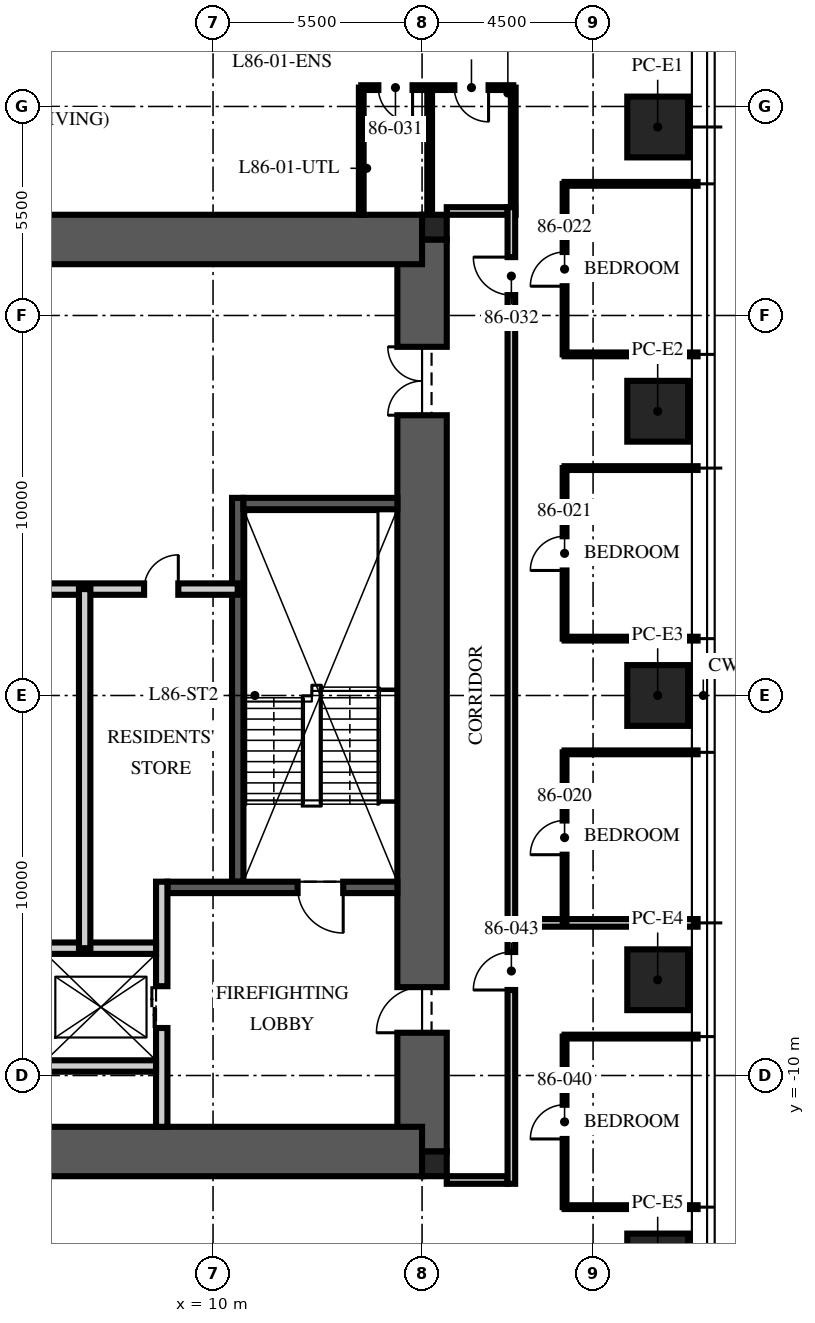
"""IFC4 building model, lengths in metres.
Left out: names, types, materials, properties, quantities, classifications, styles, units other than length and angle.
Written with IfcOpenShell. Run it as: python <this file> out.ifc"""

import sys

from ifc_helpers import new_model, si_unit, direction, frame, frame_2d, origin, origin_2d, place, context, subcontext, project, spatial, rectangle, extrude, element, fill, save


model = new_model("IFC4")
c1 = context("Model", 3, precision=1e-05, world=origin(), true_north=direction((0.0, 1.0)))
c2 = subcontext(c1, "Body", "Model", "MODEL_VIEW")
j1 = project(units=[si_unit("LENGTHUNIT", "METRE"), si_unit("PLANEANGLEUNIT", "RADIAN")], contexts=[c1])
p1 = place(None, origin())
s1 = spatial("IfcSite", under=j1, at=p1, CompositionType="ELEMENT")
p2 = place(p1, origin())
s2 = spatial("IfcBuilding", under=s1, at=p2, CompositionType="ELEMENT")
p3 = place(p2, frame((0.0, 0.0, 342.0)))
s3 = spatial("IfcBuildingStorey", under=s2, at=p3, CompositionType="ELEMENT", Elevation=342.0)
p4 = place(p3, frame((15.5, -12.0, -0.25), z_axis=(0.0, 0.0, 1.0), x_axis=(0.0, 1.0, 0.0)))
e1 = element("IfcWall", 1, at=p4, inside=s3, PredefinedType="SHEAR", context=c2, shape_type="SweptSolid", body=[
    extrude(rectangle(XDim=24.0, YDim=1.3, at=frame_2d((12.0, 0.0))), origin(), (0.0, 0.0, 1.0), 3.75),
])
p5 = place(p4, frame((3.125, 0.0, 0.25)))
e2 = element("IfcOpeningElement", 2, at=p5, cuts=e1, PredefinedType="OPENING", context=c2, shape_type="SweptSolid", body=[
    extrude(rectangle(XDim=1.2, YDim=2.1, at=frame_2d((0.6, 1.05))), frame((0.0, 0.66, 0.0), z_axis=(0.0, -1.0, 0.0), x_axis=(1.0, 0.0, 0.0)), (0.0, 0.0, 1.0), 1.32),
])
p6 = place(p4, frame((19.375, 0.0, 0.25)))
e3 = element("IfcOpeningElement", 3, at=p6, cuts=e1, PredefinedType="OPENING", context=c2, shape_type="SweptSolid", body=[
    extrude(rectangle(XDim=1.8, YDim=2.1, at=frame_2d((0.9, 1.05))), frame((0.0, 0.66, 0.0), z_axis=(0.0, -1.0, 0.0), x_axis=(1.0, 0.0, 0.0)), (0.0, 0.0, 1.0), 1.32),
])
for number, where, z_axis, x_axis in (
    (4, (-15.5, 12.0, -0.25), (0.0, 0.0, 1.0), (1.0, 0.0, 0.0)),
    (5, (-15.5, -12.0, -0.25), (0.0, 0.0, 1.0), (1.0, 0.0, 0.0)),
):
    element("IfcWall", number, at=place(p3, frame(where, z_axis=z_axis, x_axis=x_axis)), inside=s3, PredefinedType="SHEAR", context=c2, shape_type="SweptSolid", body=[
        extrude(rectangle(XDim=31.0, YDim=1.3, at=frame_2d((15.5, 0.0))), origin(), (0.0, 0.0, 1.0), 3.75),
    ])
for number, where, z_axis, x_axis in (
    (6, (15.825, 12.325, -0.25), (0.0, 0.0, 1.0), (1.0, 0.0, 0.0)),
    (7, (15.825, -12.325, -0.25), (0.0, 0.0, 1.0), (1.0, 0.0, 0.0)),
):
    element("IfcColumn", number, at=place(p3, frame(where, z_axis=z_axis, x_axis=x_axis)), inside=s3, PredefinedType="COLUMN", context=c2, shape_type="SweptSolid", body=[
        extrude(rectangle(XDim=0.65, YDim=0.65, at=origin_2d()), origin(), (0.0, 0.0, 1.0), 3.75),
    ])
for number, where, z_axis, x_axis in (
    (8, (21.7, 14.96, 0.0), (0.0, 0.0, 1.0), (0.0, 1.0, 0.0)),
    (9, (21.7, 7.48, 0.0), (0.0, 0.0, 1.0), (0.0, 1.0, 0.0)),
    (10, (21.7, 0.0, 0.0), (0.0, 0.0, 1.0), (0.0, 1.0, 0.0)),
    (11, (21.7, -7.48, 0.0), (0.0, 0.0, 1.0), (0.0, 1.0, 0.0)),
    (12, (21.7, -14.96, 0.0), (0.0, 0.0, 1.0), (0.0, 1.0, 0.0)),
):
    element("IfcColumn", number, at=place(p3, frame(where, z_axis=z_axis, x_axis=x_axis)), inside=s3, PredefinedType="COLUMN", context=c2, shape_type="SweptSolid", body=[
        extrude(rectangle(XDim=1.6, YDim=1.6, at=origin_2d()), origin(), (0.0, 0.0, 1.0), 3.75),
    ])
p7 = place(p3, frame((10.65, -4.9, 0.0), z_axis=(0.0, 0.0, 1.0), x_axis=(0.0, 1.0, 0.0)))
e13 = element("IfcWall", 13, at=p7, inside=s3, PredefinedType="SOLIDWALL", context=c2, shape_type="SweptSolid", body=[
    extrude(rectangle(XDim=10.1, YDim=0.3, at=frame_2d((5.05, 0.0))), origin(), (0.0, 0.0, 1.0), 3.5),
])
p8 = place(p3, frame((14.85, -5.05, 0.0), z_axis=(0.0, 0.0, 1.0), x_axis=(-1.0, 0.0, 0.0)))
e14 = element("IfcWall", 14, at=p8, inside=s3, PredefinedType="SOLIDWALL", context=c2, shape_type="SweptSolid", body=[
    extrude(rectangle(XDim=6.05, YDim=0.3, at=frame_2d((3.025, 0.0))), origin(), (0.0, 0.0, 1.0), 3.5),
])
p9 = place(p8, frame((1.425, 0.0, 0.0)))
e15 = element("IfcOpeningElement", 15, at=p9, cuts=e14, PredefinedType="OPENING", context=c2, shape_type="SweptSolid", body=[
    extrude(rectangle(XDim=1.2, YDim=2.1, at=frame_2d((0.6, 1.05))), frame((0.0, 0.16, 0.0), z_axis=(0.0, -1.0, 0.0), x_axis=(1.0, 0.0, 0.0)), (0.0, 0.0, 1.0), 0.32),
])
p10 = place(p3, frame((14.85, 5.05, 0.0), z_axis=(0.0, 0.0, 1.0), x_axis=(-1.0, 0.0, 0.0)))
e16 = element("IfcWall", 16, at=p10, inside=s3, PredefinedType="SOLIDWALL", context=c2, shape_type="SweptSolid", body=[
    extrude(rectangle(XDim=4.05, YDim=0.3, at=frame_2d((2.025, 0.0))), origin(), (0.0, 0.0, 1.0), 3.5),
])
p11 = place(p3, frame((8.65, -11.35, 0.0), z_axis=(0.0, 0.0, 1.0), x_axis=(0.0, 1.0, 0.0)))
e17 = element("IfcWall", 17, at=p11, inside=s3, PredefinedType="PARTITIONING", context=c2, shape_type="SweptSolid", body=[
    extrude(rectangle(XDim=6.45, YDim=0.3, at=frame_2d((3.225, 0.0))), origin(), (0.0, 0.0, 1.0), 3.5),
])
p12 = place(p11, frame((2.6, 0.0, 0.0)))
e18 = element("IfcOpeningElement", 18, at=p12, cuts=e17, PredefinedType="OPENING", context=c2, shape_type="SweptSolid", body=[
    extrude(rectangle(XDim=1.1, YDim=2.1, at=frame_2d((0.55, 1.05))), frame((0.0, 0.16, 0.0), z_axis=(0.0, -1.0, 0.0), x_axis=(1.0, 0.0, 0.0)), (0.0, 0.0, 1.0), 0.32),
])
p13 = place(p3, frame((-8.5, -6.65, 0.0), z_axis=(0.0, 0.0, 1.0), x_axis=(1.0, 0.0, 0.0)))
e19 = element("IfcWall", 19, at=p13, inside=s3, PredefinedType="PARTITIONING", context=c2, shape_type="SweptSolid", body=[
    extrude(rectangle(XDim=17.0, YDim=0.3, at=frame_2d((8.5, 0.0))), origin(), (0.0, 0.0, 1.0), 3.5),
])
p14 = place(p13, frame((7.8, 0.0, 0.0)))
e20 = element("IfcOpeningElement", 20, at=p14, cuts=e19, PredefinedType="OPENING", context=c2, shape_type="SweptSolid", body=[
    extrude(rectangle(XDim=1.3, YDim=2.4, at=frame_2d((0.65, 1.2))), frame((0.0, 0.16, 0.0), z_axis=(0.0, -1.0, 0.0), x_axis=(1.0, 0.0, 0.0)), (0.0, 0.0, 1.0), 0.32),
])
p15 = place(p13, frame((5.65, 0.0, 0.0)))
e21 = element("IfcOpeningElement", 21, at=p15, cuts=e19, PredefinedType="OPENING", context=c2, shape_type="SweptSolid", body=[
    extrude(rectangle(XDim=0.9, YDim=2.1, at=frame_2d((0.45, 1.05))), frame((0.0, 0.16, 0.0), z_axis=(0.0, -1.0, 0.0), x_axis=(1.0, 0.0, 0.0)), (0.0, 0.0, 1.0), 0.32),
])
p16 = place(p13, frame((10.4, 0.0, 0.0)))
e22 = element("IfcOpeningElement", 22, at=p16, cuts=e19, PredefinedType="OPENING", context=c2, shape_type="SweptSolid", body=[
    extrude(rectangle(XDim=0.9, YDim=2.1, at=frame_2d((0.45, 1.05))), frame((0.0, 0.16, 0.0), z_axis=(0.0, -1.0, 0.0), x_axis=(1.0, 0.0, 0.0)), (0.0, 0.0, 1.0), 0.32),
])
p17 = place(p3, frame((5.6, -9.75, 0.0), z_axis=(0.0, 0.0, 1.0), x_axis=(1.0, 0.0, 0.0)))
e23 = element("IfcWall", 23, at=p17, inside=s3, PredefinedType="PARTITIONING", context=c2, shape_type="SweptSolid", body=[
    extrude(rectangle(XDim=2.9, YDim=0.3, at=frame_2d((1.45, 0.0))), origin(), (0.0, 0.0, 1.0), 3.5),
])
p18 = place(p3, frame((-10.65, 2.8, 0.0), z_axis=(0.0, 0.0, 1.0), x_axis=(1.0, 0.0, 0.0)))
e24 = element("IfcWall", 24, at=p18, inside=s3, PredefinedType="PARTITIONING", context=c2, shape_type="SweptSolid", body=[
    extrude(rectangle(XDim=21.3, YDim=0.3, at=frame_2d((10.65, 0.0))), origin(), (0.0, 0.0, 1.0), 3.5),
])
p19 = place(p18, frame((10.05, 0.0, 0.0)))
e25 = element("IfcOpeningElement", 25, at=p19, cuts=e24, PredefinedType="OPENING", context=c2, shape_type="SweptSolid", body=[
    extrude(rectangle(XDim=1.2, YDim=2.1, at=frame_2d((0.6, 1.05))), frame((0.0, 0.16, 0.0), z_axis=(0.0, -1.0, 0.0), x_axis=(1.0, 0.0, 0.0)), (0.0, 0.0, 1.0), 0.32),
])
p20 = place(p18, frame((1.493, 0.0, 0.0)))
e26 = element("IfcOpeningElement", 26, at=p20, cuts=e24, PredefinedType="OPENING", context=c2, shape_type="SweptSolid", body=[
    extrude(rectangle(XDim=0.9, YDim=2.1, at=frame_2d((0.45, 1.05))), frame((0.0, 0.16, 0.0), z_axis=(0.0, -1.0, 0.0), x_axis=(1.0, 0.0, 0.0)), (0.0, 0.0, 1.0), 0.32),
])
p21 = place(p18, frame((18.836, 0.0, 0.0)))
e27 = element("IfcOpeningElement", 27, at=p21, cuts=e24, PredefinedType="OPENING", context=c2, shape_type="SweptSolid", body=[
    extrude(rectangle(XDim=0.9, YDim=2.1, at=frame_2d((0.45, 1.05))), frame((0.0, 0.16, 0.0), z_axis=(0.0, -1.0, 0.0), x_axis=(1.0, 0.0, 0.0)), (0.0, 0.0, 1.0), 0.32),
])
p22 = place(p3, frame((6.622, -6.65, 0.0), z_axis=(0.0, 0.0, 1.0), x_axis=(0.0, 1.0, 0.0)))
e28 = element("IfcWall", 28, at=p22, inside=s3, PredefinedType="PARTITIONING", context=c2, shape_type="SweptSolid", body=[
    extrude(rectangle(XDim=9.45, YDim=0.3, at=frame_2d((4.725, 0.0))), origin(), (0.0, 0.0, 1.0), 3.5),
])
for number, where, z_axis, x_axis in (
    (29, (16.15, 12.75, 0.0), (0.0, 0.0, 1.0), (1.0, 0.0, 0.0)),
    (30, (16.15, -12.75, 0.0), (0.0, 0.0, 1.0), (1.0, 0.0, 0.0)),
):
    element("IfcWall", number, at=place(p3, frame(where, z_axis=z_axis, x_axis=x_axis)), inside=s3, PredefinedType="PARTITIONING", context=c2, shape_type="SweptSolid", body=[
        extrude(rectangle(XDim=1.6, YDim=0.2, at=frame_2d((0.8, 0.0))), origin(), (0.0, 0.0, 1.0), 2.6),
    ])
p23 = place(p3, frame((17.95, -5.984, 0.0), z_axis=(0.0, 0.0, 1.0), x_axis=(1.0, 0.0, 0.0)))
e31 = element("IfcWall", 31, at=p23, inside=s3, PredefinedType="PARTITIONING", context=c2, shape_type="SweptSolid", body=[
    extrude(rectangle(XDim=4.8, YDim=0.2, at=frame_2d((2.4, 0.0))), origin(), (0.0, 0.0, 1.0), 3.01),
])
for number, where, z_axis, x_axis in (
    (32, (19.25, -1.496, 0.0), (0.0, 0.0, 1.0), (1.0, 0.0, 0.0)),
    (33, (19.25, 1.496, 0.0), (0.0, 0.0, 1.0), (1.0, 0.0, 0.0)),
    (34, (19.25, 5.984, 0.0), (0.0, 0.0, 1.0), (1.0, 0.0, 0.0)),
    (35, (19.25, 8.976, 0.0), (0.0, 0.0, 1.0), (1.0, 0.0, 0.0)),
    (36, (19.25, 13.464, 0.0), (0.0, 0.0, 1.0), (1.0, 0.0, 0.0)),
    (37, (19.25, -13.464, 0.0), (0.0, 0.0, 1.0), (1.0, 0.0, 0.0)),
    (38, (19.25, -8.976, 0.0), (0.0, 0.0, 1.0), (1.0, 0.0, 0.0)),
):
    element("IfcWall", number, at=place(p3, frame(where, z_axis=z_axis, x_axis=x_axis)), inside=s3, PredefinedType="PARTITIONING", context=c2, shape_type="SweptSolid", body=[
        extrude(rectangle(XDim=3.5, YDim=0.1, at=frame_2d((1.75, 0.0))), origin(), (0.0, 0.0, 1.0), 3.01),
    ])
p24 = place(p3, frame((19.25, -5.984, 0.0), z_axis=(0.0, 0.0, 1.0), x_axis=(0.0, 1.0, 0.0)))
e39 = element("IfcWall", 39, at=p24, inside=s3, PredefinedType="PARTITIONING", context=c2, shape_type="SweptSolid", body=[
    extrude(rectangle(XDim=4.488, YDim=0.1, at=frame_2d((2.244, 0.0))), origin(), (0.0, 0.0, 1.0), 2.91),
])
p25 = place(p24, frame((1.794, 0.0, 0.0)))
e40 = element("IfcOpeningElement", 40, at=p25, cuts=e39, PredefinedType="OPENING", context=c2, shape_type="SweptSolid", body=[
    extrude(rectangle(XDim=0.9, YDim=2.1, at=frame_2d((0.45, 1.05))), frame((0.0, 0.06, 0.0), z_axis=(0.0, -1.0, 0.0), x_axis=(1.0, 0.0, 0.0)), (0.0, 0.0, 1.0), 0.12),
])
p26 = place(p3, frame((19.25, 1.496, 0.0), z_axis=(0.0, 0.0, 1.0), x_axis=(0.0, 1.0, 0.0)))
e41 = element("IfcWall", 41, at=p26, inside=s3, PredefinedType="PARTITIONING", context=c2, shape_type="SweptSolid", body=[
    extrude(rectangle(XDim=4.488, YDim=0.1, at=frame_2d((2.244, 0.0))), origin(), (0.0, 0.0, 1.0), 2.91),
])
p27 = place(p26, frame((1.794, 0.0, 0.0)))
e42 = element("IfcOpeningElement", 42, at=p27, cuts=e41, PredefinedType="OPENING", context=c2, shape_type="SweptSolid", body=[
    extrude(rectangle(XDim=0.9, YDim=2.1, at=frame_2d((0.45, 1.05))), frame((0.0, 0.06, 0.0), z_axis=(0.0, -1.0, 0.0), x_axis=(1.0, 0.0, 0.0)), (0.0, 0.0, 1.0), 0.12),
])
p28 = place(p3, frame((19.25, 8.976, 0.0), z_axis=(0.0, 0.0, 1.0), x_axis=(0.0, 1.0, 0.0)))
e43 = element("IfcWall", 43, at=p28, inside=s3, PredefinedType="PARTITIONING", context=c2, shape_type="SweptSolid", body=[
    extrude(rectangle(XDim=4.488, YDim=0.1, at=frame_2d((2.244, 0.0))), origin(), (0.0, 0.0, 1.0), 2.91),
])
p29 = place(p28, frame((1.794, 0.0, 0.0)))
e44 = element("IfcOpeningElement", 44, at=p29, cuts=e43, PredefinedType="OPENING", context=c2, shape_type="SweptSolid", body=[
    extrude(rectangle(XDim=0.9, YDim=2.1, at=frame_2d((0.45, 1.05))), frame((0.0, 0.06, 0.0), z_axis=(0.0, -1.0, 0.0), x_axis=(1.0, 0.0, 0.0)), (0.0, 0.0, 1.0), 0.12),
])
p30 = place(p3, frame((17.9, 15.996, 0.0), z_axis=(0.0, 0.0, 1.0), x_axis=(-1.0, 0.0, 0.0)))
e45 = element("IfcWall", 45, at=p30, inside=s3, PredefinedType="PARTITIONING", context=c2, shape_type="SweptSolid", body=[
    extrude(rectangle(XDim=4.0, YDim=0.125, at=frame_2d((2.0, 0.0))), origin(), (0.0, 0.0, 1.0), 2.6),
])
p31 = place(p30, frame((0.65, 0.0, 0.0)))
e46 = element("IfcOpeningElement", 46, at=p31, cuts=e45, PredefinedType="OPENING", context=c2, shape_type="SweptSolid", body=[
    extrude(rectangle(XDim=0.9, YDim=2.1, at=frame_2d((0.45, 1.05))), frame((0.0, 0.073, 0.0), z_axis=(0.0, -1.0, 0.0), x_axis=(1.0, 0.0, 0.0)), (0.0, 0.0, 1.0), 0.145),
])
p32 = place(p30, frame((2.65, 0.0, 0.0)))
e47 = element("IfcOpeningElement", 47, at=p32, cuts=e45, PredefinedType="OPENING", context=c2, shape_type="SweptSolid", body=[
    extrude(rectangle(XDim=0.9, YDim=2.1, at=frame_2d((0.45, 1.05))), frame((0.0, 0.073, 0.0), z_axis=(0.0, -1.0, 0.0), x_axis=(1.0, 0.0, 0.0)), (0.0, 0.0, 1.0), 0.145),
])
for number, where, z_axis, x_axis in (
    (48, (17.9, 12.65, 0.0), (0.0, 0.0, 1.0), (0.0, 1.0, 0.0)),
    (49, (15.7, 12.65, 0.0), (0.0, 0.0, 1.0), (0.0, 1.0, 0.0)),
):
    element("IfcWall", number, at=place(p3, frame(where, z_axis=z_axis, x_axis=x_axis)), inside=s3, PredefinedType="PARTITIONING", context=c2, shape_type="SweptSolid", body=[
        extrude(rectangle(XDim=3.346, YDim=0.125, at=frame_2d((1.673, 0.0))), origin(), (0.0, 0.0, 1.0), 2.6),
    ])
p33 = place(p3, frame((13.9, 12.65, 0.0), z_axis=(0.0, 0.0, 1.0), x_axis=(0.0, 1.0, 0.0)))
e50 = element("IfcWall", 50, at=p33, inside=s3, PredefinedType="PARTITIONING", context=c2, shape_type="SweptSolid", body=[
    extrude(rectangle(XDim=3.346, YDim=0.125, at=frame_2d((1.673, 0.0))), origin(), (0.0, 0.0, 1.0), 3.5),
])
p34 = place(p3, frame((19.25, -13.464, 0.0), z_axis=(0.0, 0.0, 1.0), x_axis=(0.0, 1.0, 0.0)))
e51 = element("IfcWall", 51, at=p34, inside=s3, PredefinedType="PARTITIONING", context=c2, shape_type="SweptSolid", body=[
    extrude(rectangle(XDim=4.488, YDim=0.1, at=frame_2d((2.244, 0.0))), origin(), (0.0, 0.0, 1.0), 2.91),
])
p35 = place(p34, frame((1.794, 0.0, 0.0)))
e52 = element("IfcOpeningElement", 52, at=p35, cuts=e51, PredefinedType="OPENING", context=c2, shape_type="SweptSolid", body=[
    extrude(rectangle(XDim=0.9, YDim=2.1, at=frame_2d((0.45, 1.05))), frame((0.0, 0.06, 0.0), z_axis=(0.0, -1.0, 0.0), x_axis=(1.0, 0.0, 0.0)), (0.0, 0.0, 1.0), 0.12),
])
p36 = place(p3, frame((17.85, -12.85, 0.0), z_axis=(0.0, 0.0, 1.0), x_axis=(0.0, 1.0, 0.0)))
e53 = element("IfcWall", 53, at=p36, inside=s3, PredefinedType="PARTITIONING", context=c2, shape_type="SweptSolid", body=[
    extrude(rectangle(XDim=25.7, YDim=0.2, at=frame_2d((12.85, 0.0))), origin(), (0.0, 0.0, 1.0), 2.9),
])
p37 = place(p36, frame((23.386, 0.0, 0.0)))
e54 = element("IfcOpeningElement", 54, at=p37, cuts=e53, PredefinedType="OPENING", context=c2, shape_type="SweptSolid", body=[
    extrude(rectangle(XDim=1.0, YDim=2.2, at=frame_2d((0.5, 1.1))), frame((0.0, 0.11, 0.0), z_axis=(0.0, -1.0, 0.0), x_axis=(1.0, 0.0, 0.0)), (0.0, 0.0, 1.0), 0.22),
])
p38 = place(p36, frame((5.1, 0.0, 0.0)))
e55 = element("IfcOpeningElement", 55, at=p38, cuts=e53, PredefinedType="OPENING", context=c2, shape_type="SweptSolid", body=[
    extrude(rectangle(XDim=1.0, YDim=2.2, at=frame_2d((0.5, 1.1))), frame((0.0, 0.11, 0.0), z_axis=(0.0, -1.0, 0.0), x_axis=(1.0, 0.0, 0.0)), (0.0, 0.0, 1.0), 0.22),
])
p39 = place(p9, origin())
e56 = element("IfcDoor", 56, at=p39, inside=s3, OperationType="SINGLE_SWING_LEFT", PredefinedType="DOOR", context=c2, shape_type="SweptSolid", body=[
    extrude(rectangle(XDim=1.2, YDim=2.1, at=frame_2d((0.6, 1.05))), frame((0.0, 0.025, 0.0), z_axis=(0.0, -1.0, 0.0), x_axis=(1.0, 0.0, 0.0)), (0.0, 0.0, 1.0), 0.05),
])
fill(e15, e56)
p40 = place(p5, origin())
e57 = element("IfcDoor", 57, at=p40, inside=s3, OperationType="SINGLE_SWING_LEFT", PredefinedType="DOOR", context=c2, shape_type="SweptSolid", body=[
    extrude(rectangle(XDim=1.2, YDim=2.1, at=frame_2d((0.6, 1.05))), frame((0.0, 0.025, 0.0), z_axis=(0.0, -1.0, 0.0), x_axis=(1.0, 0.0, 0.0)), (0.0, 0.0, 1.0), 0.05),
])
fill(e2, e57)
p41 = place(p6, origin())
e58 = element("IfcDoor", 58, at=p41, inside=s3, OperationType="DOUBLE_DOOR_SINGLE_SWING", PredefinedType="DOOR", context=c2, shape_type="SweptSolid", body=[
    extrude(rectangle(XDim=1.8, YDim=2.1, at=frame_2d((0.9, 1.05))), frame((0.0, 0.025, 0.0), z_axis=(0.0, -1.0, 0.0), x_axis=(1.0, 0.0, 0.0)), (0.0, 0.0, 1.0), 0.05),
])
fill(e3, e58)
p42 = place(p12, origin())
e59 = element("IfcDoor", 59, at=p42, inside=s3, OperationType="DOUBLE_DOOR_SLIDING", PredefinedType="DOOR", context=c2, shape_type="SweptSolid", body=[
    extrude(rectangle(XDim=1.1, YDim=2.1, at=frame_2d((0.55, 1.05))), frame((0.0, 0.025, 0.0), z_axis=(0.0, -1.0, 0.0), x_axis=(1.0, 0.0, 0.0)), (0.0, 0.0, 1.0), 0.05),
])
fill(e18, e59)
p43 = place(p21, origin())
e60 = element("IfcDoor", 60, at=p43, inside=s3, OperationType="SINGLE_SWING_RIGHT", PredefinedType="DOOR", context=c2, shape_type="SweptSolid", body=[
    extrude(rectangle(XDim=0.9, YDim=2.1, at=frame_2d((0.45, 1.05))), frame((0.0, 0.025, 0.0), z_axis=(0.0, -1.0, 0.0), x_axis=(1.0, 0.0, 0.0)), (0.0, 0.0, 1.0), 0.05),
])
fill(e27, e60)
p44 = place(p25, origin())
e61 = element("IfcDoor", 61, at=p44, inside=s3, OperationType="SINGLE_SWING_LEFT", PredefinedType="DOOR", context=c2, shape_type="SweptSolid", body=[
    extrude(rectangle(XDim=0.9, YDim=2.1, at=frame_2d((0.45, 1.05))), frame((0.0, 0.025, 0.0), z_axis=(0.0, -1.0, 0.0), x_axis=(1.0, 0.0, 0.0)), (0.0, 0.0, 1.0), 0.05),
])
fill(e40, e61)
p45 = place(p27, origin())
e62 = element("IfcDoor", 62, at=p45, inside=s3, OperationType="SINGLE_SWING_LEFT", PredefinedType="DOOR", context=c2, shape_type="SweptSolid", body=[
    extrude(rectangle(XDim=0.9, YDim=2.1, at=frame_2d((0.45, 1.05))), frame((0.0, 0.025, 0.0), z_axis=(0.0, -1.0, 0.0), x_axis=(1.0, 0.0, 0.0)), (0.0, 0.0, 1.0), 0.05),
])
fill(e42, e62)
p46 = place(p29, origin())
e63 = element("IfcDoor", 63, at=p46, inside=s3, OperationType="SINGLE_SWING_LEFT", PredefinedType="DOOR", context=c2, shape_type="SweptSolid", body=[
    extrude(rectangle(XDim=0.9, YDim=2.1, at=frame_2d((0.45, 1.05))), frame((0.0, 0.025, 0.0), z_axis=(0.0, -1.0, 0.0), x_axis=(1.0, 0.0, 0.0)), (0.0, 0.0, 1.0), 0.05),
])
fill(e44, e63)
p47 = place(p31, origin())
e64 = element("IfcDoor", 64, at=p47, inside=s3, OperationType="SINGLE_SWING_LEFT", PredefinedType="DOOR", context=c2, shape_type="SweptSolid", body=[
    extrude(rectangle(XDim=0.9, YDim=2.1, at=frame_2d((0.45, 1.05))), frame((0.0, 0.025, 0.0), z_axis=(0.0, -1.0, 0.0), x_axis=(1.0, 0.0, 0.0)), (0.0, 0.0, 1.0), 0.05),
])
fill(e46, e64)
p48 = place(p32, origin())
e65 = element("IfcDoor", 65, at=p48, inside=s3, OperationType="SINGLE_SWING_LEFT", PredefinedType="DOOR", context=c2, shape_type="SweptSolid", body=[
    extrude(rectangle(XDim=0.9, YDim=2.1, at=frame_2d((0.45, 1.05))), frame((0.0, 0.025, 0.0), z_axis=(0.0, -1.0, 0.0), x_axis=(1.0, 0.0, 0.0)), (0.0, 0.0, 1.0), 0.05),
])
fill(e47, e65)
p49 = place(p37, origin())
e66 = element("IfcDoor", 66, at=p49, inside=s3, OperationType="SINGLE_SWING_RIGHT", PredefinedType="DOOR", context=c2, shape_type="SweptSolid", body=[
    extrude(rectangle(XDim=1.0, YDim=2.2, at=frame_2d((0.5, 1.1))), frame((0.0, 0.025, 0.0), z_axis=(0.0, -1.0, 0.0), x_axis=(1.0, 0.0, 0.0)), (0.0, 0.0, 1.0), 0.05),
])
fill(e54, e66)
p50 = place(p35, origin())
e67 = element("IfcDoor", 67, at=p50, inside=s3, OperationType="SINGLE_SWING_LEFT", PredefinedType="DOOR", context=c2, shape_type="SweptSolid", body=[
    extrude(rectangle(XDim=0.9, YDim=2.1, at=frame_2d((0.45, 1.05))), frame((0.0, 0.025, 0.0), z_axis=(0.0, -1.0, 0.0), x_axis=(1.0, 0.0, 0.0)), (0.0, 0.0, 1.0), 0.05),
])
fill(e52, e67)
p51 = place(p38, origin())
e68 = element("IfcDoor", 68, at=p51, inside=s3, OperationType="SINGLE_SWING_LEFT", PredefinedType="DOOR", context=c2, shape_type="SweptSolid", body=[
    extrude(rectangle(XDim=1.0, YDim=2.2, at=frame_2d((0.5, 1.1))), frame((0.0, 0.025, 0.0), z_axis=(0.0, -1.0, 0.0), x_axis=(1.0, 0.0, 0.0)), (0.0, 0.0, 1.0), 0.05),
])
fill(e55, e68)
save(model, sys.argv[1])
